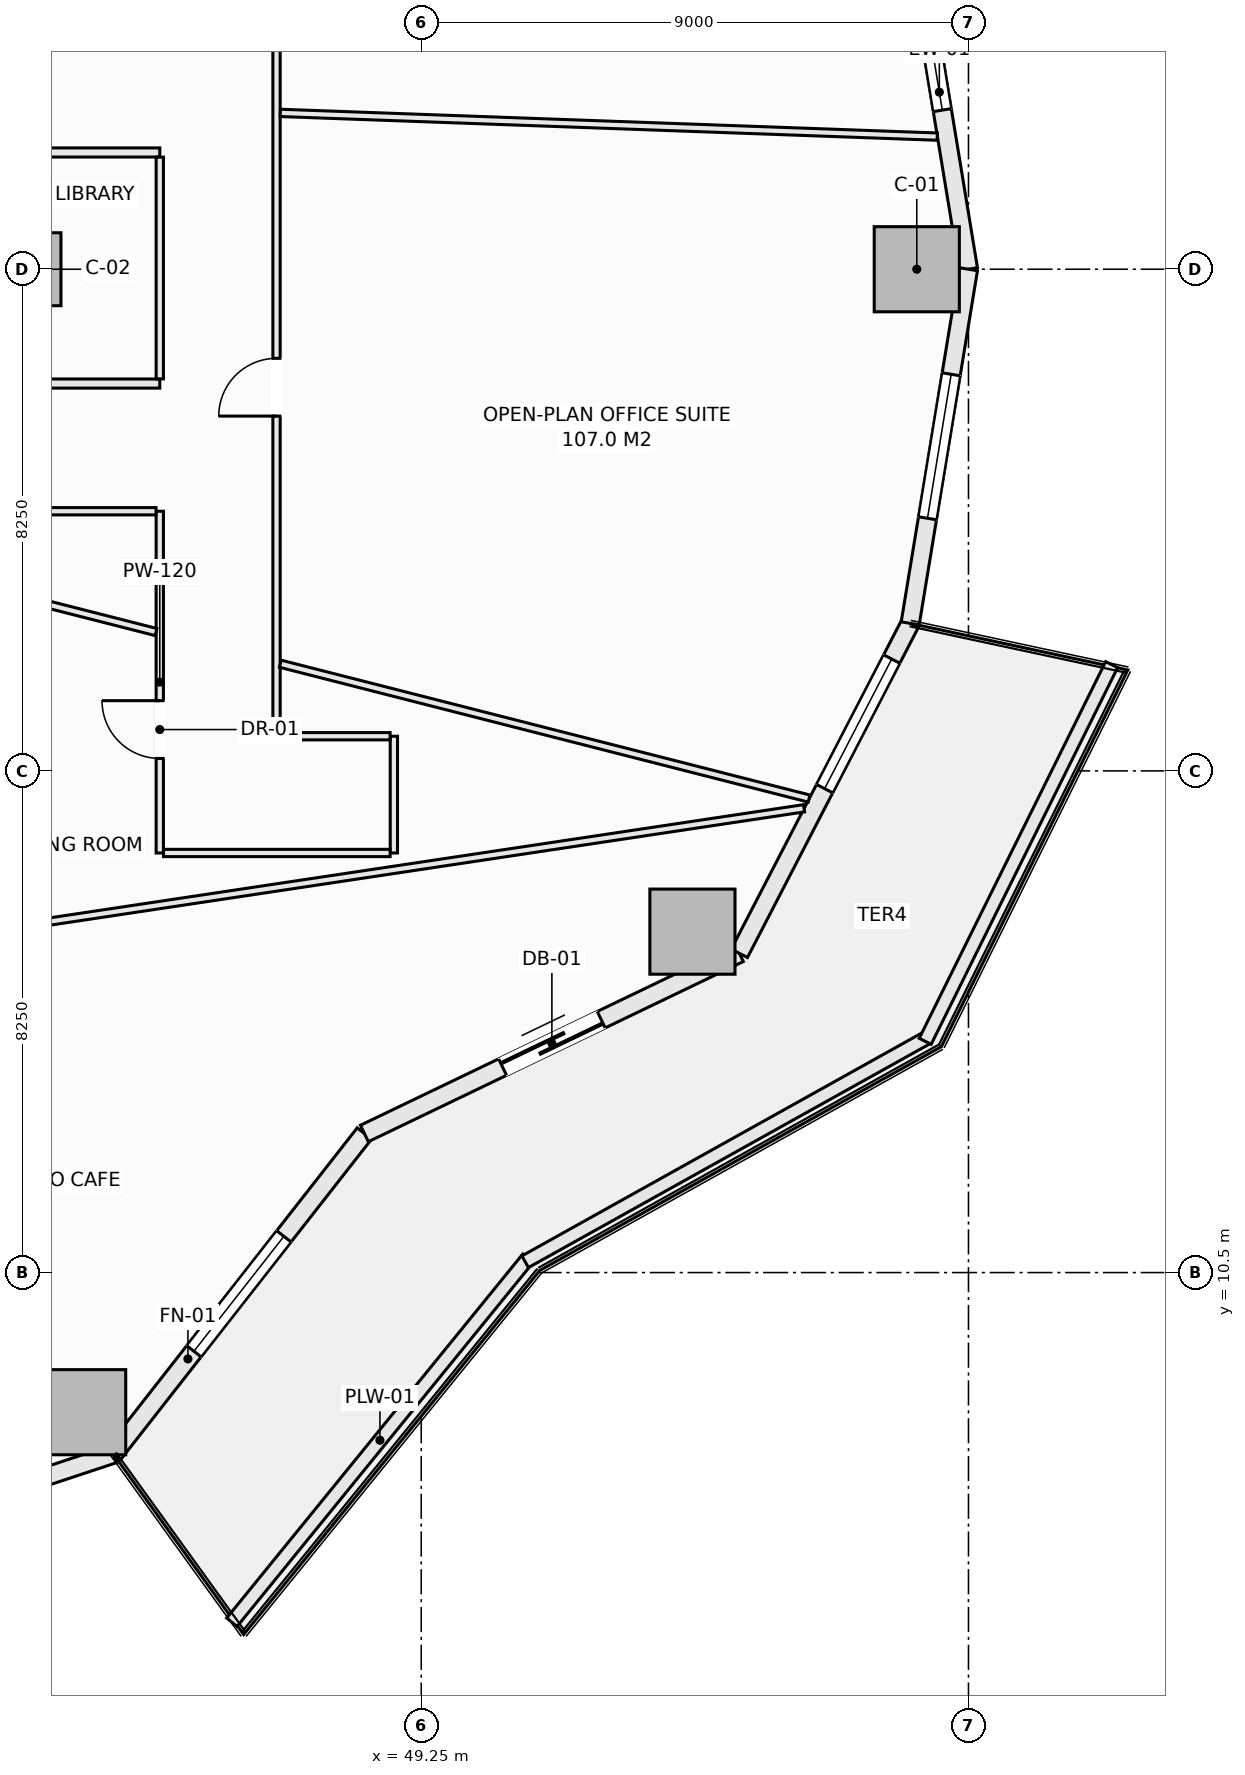
"""IFC4 building model, lengths in metres.
Left out: names, types, materials, properties, quantities, classifications, styles, units other than length and angle.
Written with IfcOpenShell. Run it as: python <this file> out.ifc"""

import sys

from ifc_helpers import new_model, si_unit, direction, frame, frame_2d, origin, origin_2d, place, context, subcontext, project, spatial, rectangle, extrude, element, fill, save


model = new_model("IFC4")
c1 = context("Model", 3, precision=1e-05, world=origin(), true_north=direction((0.0, 1.0)))
c2 = subcontext(c1, "Body", "Model", "MODEL_VIEW")
j1 = project(units=[si_unit("LENGTHUNIT", "METRE"), si_unit("PLANEANGLEUNIT", "RADIAN")], contexts=[c1])
p1 = place(None, origin())
s1 = spatial("IfcSite", under=j1, at=p1, CompositionType="ELEMENT")
p2 = place(p1, origin())
s2 = spatial("IfcBuilding", under=s1, at=p2, CompositionType="ELEMENT")
p3 = place(p2, frame((0.0, 0.0, 45.75)))
s3 = spatial("IfcBuildingStorey", under=s2, at=p3, CompositionType="ELEMENT", Elevation=45.75)
for number, where, z_axis, x_axis in (
    (1, (57.4, 27.0, -0.28), (0.0, 0.0, 1.0), (1.0, 0.0, 0.0)),
    (2, (43.69, 8.204, -0.28), (0.0, 0.0, 1.0), (1.0, 0.0, 0.0)),
    (3, (53.71, 16.106, -0.28), (0.0, 0.0, 1.0), (1.0, 0.0, 0.0)),
):
    element("IfcColumn", number, at=place(p3, frame(where, z_axis=z_axis, x_axis=x_axis)), inside=s3, PredefinedType="COLUMN", context=c2, shape_type="SweptSolid", body=[
        extrude(rectangle(XDim=1.4, YDim=1.4, at=origin_2d()), origin(), (0.0, 0.0, 1.0), 3.85),
    ])
p4 = place(p3, frame((42.725, 27.0, -0.28), z_axis=(0.0, 0.0, 1.0), x_axis=(1.0, 0.0, 0.0)))
e4 = element("IfcColumn", 4, at=p4, inside=s3, PredefinedType="COLUMN", context=c2, shape_type="SweptSolid", body=[
    extrude(rectangle(XDim=1.2, YDim=1.2, at=origin_2d()), origin(), (0.0, 0.0, 1.0), 3.85),
])
p5 = place(p3, frame((57.292, 32.823, 0.0), z_axis=(0.0, 0.0, 1.0), x_axis=(0.162366057843, -0.98673059305, 0.0)))
e5 = element("IfcWall", 5, at=p5, inside=s3, PredefinedType="SOLIDWALL", context=c2, shape_type="SweptSolid", body=[
    extrude(rectangle(XDim=5.902, YDim=0.3, at=frame_2d((2.951, 0.0))), origin(), (0.0, 0.0, 1.0), 3.093),
])
p6 = place(p5, frame((0.85, 0.0, 0.85)))
e6 = element("IfcOpeningElement", 6, at=p6, cuts=e5, PredefinedType="OPENING", context=c2, shape_type="SweptSolid", body=[
    extrude(rectangle(XDim=2.4, YDim=1.9, at=frame_2d((1.2, 0.95))), frame((0.0, 0.16, 0.0), z_axis=(0.0, -1.0, 0.0), x_axis=(1.0, 0.0, 0.0)), (0.0, 0.0, 1.0), 0.32),
])
p7 = place(p3, frame((37.404, 5.267, 0.0), z_axis=(0.0, 0.0, 1.0), x_axis=(0.949238715533, 0.31455661006, 0.0)))
e7 = element("IfcWall", 7, at=p7, inside=s3, PredefinedType="SOLIDWALL", context=c2, shape_type="SweptSolid", body=[
    extrude(rectangle(XDim=7.146, YDim=0.3, at=frame_2d((3.573, 0.0))), origin(), (0.0, 0.0, 1.0), 3.093),
])
p8 = place(p7, frame((0.85, 0.0, 0.85)))
e8 = element("IfcOpeningElement", 8, at=p8, cuts=e7, PredefinedType="OPENING", context=c2, shape_type="SweptSolid", body=[
    extrude(rectangle(XDim=2.4, YDim=1.9, at=frame_2d((1.2, 0.95))), frame((0.0, 0.16, 0.0), z_axis=(0.0, -1.0, 0.0), x_axis=(1.0, 0.0, 0.0)), (0.0, 0.0, 1.0), 0.32),
])
p9 = place(p3, frame((44.188, 7.514, 0.0), z_axis=(0.0, 0.0, 1.0), x_axis=(0.616421309777, 0.787416515482, 0.0)))
e9 = element("IfcWall", 9, at=p9, inside=s3, PredefinedType="SOLIDWALL", context=c2, shape_type="SweptSolid", body=[
    extrude(rectangle(XDim=6.696, YDim=0.3, at=frame_2d((3.348, 0.0))), origin(), (0.0, 0.0, 1.0), 3.093),
])
p10 = place(p9, frame((2.148, 0.0, 0.85)))
e10 = element("IfcOpeningElement", 10, at=p10, cuts=e9, PredefinedType="OPENING", context=c2, shape_type="SweptSolid", body=[
    extrude(rectangle(XDim=2.4, YDim=1.9, at=frame_2d((1.2, 0.95))), frame((0.0, 0.16, 0.0), z_axis=(0.0, -1.0, 0.0), x_axis=(1.0, 0.0, 0.0)), (0.0, 0.0, 1.0), 0.32),
])
p11 = place(p3, frame((48.315, 12.787, 0.0), z_axis=(0.0, 0.0, 1.0), x_axis=(0.901360393999, 0.433069786673, 0.0)))
e11 = element("IfcWall", 11, at=p11, inside=s3, PredefinedType="SOLIDWALL", context=c2, shape_type="SweptSolid", body=[
    extrude(rectangle(XDim=6.842, YDim=0.3, at=frame_2d((3.421, 0.0))), origin(), (0.0, 0.0, 1.0), 3.093),
])
p12 = place(p11, frame((2.521, 0.0, 0.0)))
e12 = element("IfcOpeningElement", 12, at=p12, cuts=e11, PredefinedType="OPENING", context=c2, shape_type="SweptSolid", body=[
    extrude(rectangle(XDim=1.8, YDim=2.25, at=frame_2d((0.9, 1.125))), frame((0.0, 0.16, 0.0), z_axis=(0.0, -1.0, 0.0), x_axis=(1.0, 0.0, 0.0)), (0.0, 0.0, 1.0), 0.32),
])
p13 = place(p3, frame((54.482, 15.75, 0.0), z_axis=(0.0, 0.0, 1.0), x_axis=(0.459809804413, 0.88801742312, 0.0)))
e13 = element("IfcWall", 13, at=p13, inside=s3, PredefinedType="SOLIDWALL", context=c2, shape_type="SweptSolid", body=[
    extrude(rectangle(XDim=6.111, YDim=0.3, at=frame_2d((3.055, 0.0))), origin(), (0.0, 0.0, 1.0), 3.093),
])
p14 = place(p13, frame((3.05, 0.0, 0.85)))
e14 = element("IfcOpeningElement", 14, at=p14, cuts=e13, PredefinedType="OPENING", context=c2, shape_type="SweptSolid", body=[
    extrude(rectangle(XDim=2.4, YDim=1.9, at=frame_2d((1.2, 0.95))), frame((0.0, 0.16, 0.0), z_axis=(0.0, -1.0, 0.0), x_axis=(1.0, 0.0, 0.0)), (0.0, 0.0, 1.0), 0.32),
])
p15 = place(p3, frame((57.292, 21.177, 0.0), z_axis=(0.0, 0.0, 1.0), x_axis=(0.162366057843, 0.98673059305, 0.0)))
e15 = element("IfcWall", 15, at=p15, inside=s3, PredefinedType="SOLIDWALL", context=c2, shape_type="SweptSolid", body=[
    extrude(rectangle(XDim=5.902, YDim=0.3, at=frame_2d((2.951, 0.0))), origin(), (0.0, 0.0, 1.0), 3.093),
])
p16 = place(p15, frame((1.751, 0.0, 0.85)))
e16 = element("IfcOpeningElement", 16, at=p16, cuts=e15, PredefinedType="OPENING", context=c2, shape_type="SweptSolid", body=[
    extrude(rectangle(XDim=2.4, YDim=1.9, at=frame_2d((1.2, 0.95))), frame((0.0, 0.16, 0.0), z_axis=(0.0, -1.0, 0.0), x_axis=(1.0, 0.0, 0.0)), (0.0, 0.0, 1.0), 0.32),
])
p17 = place(p3, frame((46.136, 4.749, 0.0), z_axis=(0.0, 0.0, 1.0), x_axis=(0.630997450658, 0.775784903993, 0.0)))
e17 = element("IfcWall", 17, at=p17, inside=s3, PredefinedType="PARAPET", context=c2, shape_type="SweptSolid", body=[
    extrude(rectangle(XDim=7.718, YDim=0.22, at=frame_2d((3.859, 0.0))), origin(), (0.0, 0.0, 1.0), 0.52),
])
p18 = place(p3, frame((50.959, 10.678, 0.0), z_axis=(0.0, 0.0, 1.0), x_axis=(0.873500119739, 0.48682393205, 0.0)))
e18 = element("IfcWall", 18, at=p18, inside=s3, PredefinedType="PARAPET", context=c2, shape_type="SweptSolid", body=[
    extrude(rectangle(XDim=7.562, YDim=0.22, at=frame_2d((3.781, 0.0))), origin(), (0.0, 0.0, 1.0), 0.52),
])
p19 = place(p3, frame((57.539, 14.303, 0.0), z_axis=(0.0, 0.0, 1.0), x_axis=(0.443578479433, 0.8962355341, 0.0)))
e19 = element("IfcWall", 19, at=p19, inside=s3, PredefinedType="PARAPET", context=c2, shape_type="SweptSolid", body=[
    extrude(rectangle(XDim=6.911, YDim=0.22, at=frame_2d((3.456, 0.0))), origin(), (0.0, 0.0, 1.0), 0.52),
])
p20 = place(p3, frame((29.78, 25.12, 0.0), z_axis=(0.0, 0.0, 1.0), x_axis=(1.0, 0.0, 0.0)))
e20 = element("IfcWall", 20, at=p20, inside=s3, PredefinedType="PARTITIONING", context=c2, shape_type="SweptSolid", body=[
    extrude(rectangle(XDim=15.17, YDim=0.15, at=frame_2d((7.585, 0.0))), origin(), (0.0, 0.0, 1.0), 3.57),
])
p21 = place(p20, frame((3.14, 0.0, 0.0)))
e21 = element("IfcOpeningElement", 21, at=p21, cuts=e20, PredefinedType="OPENING", context=c2, shape_type="SweptSolid", body=[
    extrude(rectangle(XDim=0.95, YDim=2.1, at=frame_2d((0.475, 1.05))), frame((0.0, 0.085, 0.0), z_axis=(0.0, -1.0, 0.0), x_axis=(1.0, 0.0, 0.0)), (0.0, 0.0, 1.0), 0.17),
])
p22 = place(p20, frame((7.445, 0.0, 0.0)))
e22 = element("IfcOpeningElement", 22, at=p22, cuts=e20, PredefinedType="OPENING", context=c2, shape_type="SweptSolid", body=[
    extrude(rectangle(XDim=0.95, YDim=2.1, at=frame_2d((0.475, 1.05))), frame((0.0, 0.085, 0.0), z_axis=(0.0, -1.0, 0.0), x_axis=(1.0, 0.0, 0.0)), (0.0, 0.0, 1.0), 0.17),
])
p23 = place(p20, frame((10.995, 0.0, 0.0)))
e23 = element("IfcOpeningElement", 23, at=p23, cuts=e20, PredefinedType="OPENING", context=c2, shape_type="SweptSolid", body=[
    extrude(rectangle(XDim=0.95, YDim=2.1, at=frame_2d((0.475, 1.05))), frame((0.0, 0.085, 0.0), z_axis=(0.0, -1.0, 0.0), x_axis=(1.0, 0.0, 0.0)), (0.0, 0.0, 1.0), 0.17),
])
p24 = place(p3, frame((30.077, 28.92, 0.0), z_axis=(0.0, 0.0, 1.0), x_axis=(1.0, 0.0, 0.0)))
e24 = element("IfcWall", 24, at=p24, inside=s3, PredefinedType="PARTITIONING", context=c2, shape_type="SweptSolid", body=[
    extrude(rectangle(XDim=14.873, YDim=0.15, at=frame_2d((7.437, 0.0))), origin(), (0.0, 0.0, 1.0), 3.57),
])
p25 = place(p3, frame((44.95, 17.4, 0.0), z_axis=(0.0, 0.0, 1.0), x_axis=(0.0, 1.0, 0.0)))
e25 = element("IfcWall", 25, at=p25, inside=s3, PredefinedType="PARTITIONING", context=c2, shape_type="SweptSolid", body=[
    extrude(rectangle(XDim=5.62, YDim=0.12, at=frame_2d((2.81, 0.0))), origin(), (0.0, 0.0, 1.0), 3.57),
])
p26 = place(p25, frame((1.555, 0.0, 0.0)))
e26 = element("IfcOpeningElement", 26, at=p26, cuts=e25, PredefinedType="OPENING", context=c2, shape_type="SweptSolid", body=[
    extrude(rectangle(XDim=0.95, YDim=2.1, at=frame_2d((0.475, 1.05))), frame((0.0, 0.07, 0.0), z_axis=(0.0, -1.0, 0.0), x_axis=(1.0, 0.0, 0.0)), (0.0, 0.0, 1.0), 0.14),
])
p27 = place(p3, frame((44.95, 25.197, 0.0), z_axis=(0.0, 0.0, 1.0), x_axis=(0.0, 1.0, 0.0)))
e27 = element("IfcWall", 27, at=p27, inside=s3, PredefinedType="PARTITIONING", context=c2, shape_type="SweptSolid", body=[
    extrude(rectangle(XDim=3.646, YDim=0.12, at=frame_2d((1.823, 0.0))), origin(), (0.0, 0.0, 1.0), 3.57),
])
p28 = place(p3, frame((48.8, 17.4, 0.0), z_axis=(0.0, 0.0, 1.0), x_axis=(0.0, 1.0, 0.0)))
e28 = element("IfcWall", 28, at=p28, inside=s3, PredefinedType="PARTITIONING", context=c2, shape_type="SweptSolid", body=[
    extrude(rectangle(XDim=1.92, YDim=0.12, at=frame_2d((0.96, 0.0))), origin(), (0.0, 0.0, 1.0), 3.57),
])
p29 = place(p3, frame((46.87, 19.32, 0.0), z_axis=(0.0, 0.0, 1.0), x_axis=(0.0, 1.0, 0.0)))
e29 = element("IfcWall", 29, at=p29, inside=s3, PredefinedType="PARTITIONING", context=c2, shape_type="SweptSolid", body=[
    extrude(rectangle(XDim=14.798, YDim=0.12, at=frame_2d((7.399, 0.0))), origin(), (0.0, 0.0, 1.0), 3.57),
])
p30 = place(p29, frame((5.265, 0.0, 0.0)))
e30 = element("IfcOpeningElement", 30, at=p30, cuts=e29, PredefinedType="OPENING", context=c2, shape_type="SweptSolid", body=[
    extrude(rectangle(XDim=0.95, YDim=2.1, at=frame_2d((0.475, 1.05))), frame((0.0, 0.07, 0.0), z_axis=(0.0, -1.0, 0.0), x_axis=(1.0, 0.0, 0.0)), (0.0, 0.0, 1.0), 0.14),
])
p31 = place(p29, frame((11.845, 0.0, 0.0)))
e31 = element("IfcOpeningElement", 31, at=p31, cuts=e29, PredefinedType="OPENING", context=c2, shape_type="SweptSolid", body=[
    extrude(rectangle(XDim=0.95, YDim=2.1, at=frame_2d((0.475, 1.05))), frame((0.0, 0.07, 0.0), z_axis=(0.0, -1.0, 0.0), x_axis=(1.0, 0.0, 0.0)), (0.0, 0.0, 1.0), 0.14),
])
p32 = place(p3, frame((46.932, 19.32, 0.0), z_axis=(0.0, 0.0, 1.0), x_axis=(1.0, 0.0, 0.0)))
e32 = element("IfcWall", 32, at=p32, inside=s3, PredefinedType="PARTITIONING", context=c2, shape_type="SweptSolid", body=[
    extrude(rectangle(XDim=1.806, YDim=0.12, at=frame_2d((0.903, 0.0))), origin(), (0.0, 0.0, 1.0), 3.205),
])
p33 = place(p3, frame((45.012, 17.4, 0.0), z_axis=(0.0, 0.0, 1.0), x_axis=(1.0, 0.0, 0.0)))
e33 = element("IfcWall", 33, at=p33, inside=s3, PredefinedType="PARTITIONING", context=c2, shape_type="SweptSolid", body=[
    extrude(rectangle(XDim=3.726, YDim=0.12, at=frame_2d((1.863, 0.0))), origin(), (0.0, 0.0, 1.0), 3.57),
])
p34 = place(p3, frame((39.0, 23.02, 0.0), z_axis=(0.0, 0.0, 1.0), x_axis=(1.0, 0.0, 0.0)))
e34 = element("IfcWall", 34, at=p34, inside=s3, PredefinedType="PARTITIONING", context=c2, shape_type="SweptSolid", body=[
    extrude(rectangle(XDim=5.888, YDim=0.12, at=frame_2d((2.944, 0.0))), origin(), (0.0, 0.0, 1.0), 3.57),
])
p35 = place(p3, frame((39.015, 22.531, 0.0), z_axis=(0.0, 0.0, 1.0), x_axis=(0.968999219603, -0.247063782066, 0.0)))
e35 = element("IfcWall", 35, at=p35, inside=s3, PredefinedType="PARTITIONING", context=c2, shape_type="SweptSolid", body=[
    extrude(rectangle(XDim=6.061, YDim=0.12, at=frame_2d((3.03, 0.0))), origin(), (0.0, 0.0, 1.0), 3.205),
])
p36 = place(p3, frame((46.932, 20.512, 0.0), z_axis=(0.0, 0.0, 1.0), x_axis=(0.969002278344, -0.247051785187, 0.0)))
e36 = element("IfcWall", 36, at=p36, inside=s3, PredefinedType="PARTITIONING", context=c2, shape_type="SweptSolid", body=[
    extrude(rectangle(XDim=8.975, YDim=0.12, at=frame_2d((4.488, 0.0))), origin(), (0.0, 0.0, 1.0), 3.57),
])
p37 = place(p3, frame((38.241, 15.537, 0.0), z_axis=(0.0, 0.0, 1.0), x_axis=(0.988910037188, 0.148515784849, 0.0)))
e37 = element("IfcWall", 37, at=p37, inside=s3, PredefinedType="PARTITIONING", context=c2, shape_type="SweptSolid", body=[
    extrude(rectangle(XDim=17.499, YDim=0.12, at=frame_2d((8.75, 0.0))), origin(), (0.0, 0.0, 1.0), 3.205),
])
p38 = place(p3, frame((46.932, 29.571, 0.0), z_axis=(0.0, 0.0, 1.0), x_axis=(0.999348798182, -0.036082954031, 0.0)))
e38 = element("IfcWall", 38, at=p38, inside=s3, PredefinedType="PARTITIONING", context=c2, shape_type="SweptSolid", body=[
    extrude(rectangle(XDim=10.812, YDim=0.12, at=frame_2d((5.406, 0.0))), origin(), (0.0, 0.0, 1.0), 3.57),
])
p39 = place(p6, origin())
e39 = element("IfcWindow", 39, at=p39, inside=s3, PartitioningType="SINGLE_PANEL", PredefinedType="WINDOW", context=c2, shape_type="SweptSolid", body=[
    extrude(rectangle(XDim=2.4, YDim=1.9, at=frame_2d((1.2, 0.95))), frame((0.0, 0.03, 0.0), z_axis=(0.0, -1.0, 0.0), x_axis=(1.0, 0.0, 0.0)), (0.0, 0.0, 1.0), 0.06),
])
fill(e6, e39)
p40 = place(p10, origin())
e40 = element("IfcWindow", 40, at=p40, inside=s3, PartitioningType="SINGLE_PANEL", PredefinedType="WINDOW", context=c2, shape_type="SweptSolid", body=[
    extrude(rectangle(XDim=2.4, YDim=1.9, at=frame_2d((1.2, 0.95))), frame((0.0, 0.03, 0.0), z_axis=(0.0, -1.0, 0.0), x_axis=(1.0, 0.0, 0.0)), (0.0, 0.0, 1.0), 0.06),
])
fill(e10, e40)
p41 = place(p12, frame((1.8, 0.0, 0.0), z_axis=(0.0, 0.0, 1.0), x_axis=(-1.0, 0.0, 0.0)))
e41 = element("IfcDoor", 41, at=p41, inside=s3, OperationType="SLIDING_TO_LEFT", PredefinedType="DOOR", context=c2, shape_type="SweptSolid", body=[
    extrude(rectangle(XDim=1.8, YDim=2.25, at=frame_2d((0.9, 1.125))), frame((0.0, 0.025, 0.0), z_axis=(0.0, -1.0, 0.0), x_axis=(1.0, 0.0, 0.0)), (0.0, 0.0, 1.0), 0.05),
])
fill(e12, e41)
p42 = place(p14, origin())
e42 = element("IfcWindow", 42, at=p42, inside=s3, PartitioningType="SINGLE_PANEL", PredefinedType="WINDOW", context=c2, shape_type="SweptSolid", body=[
    extrude(rectangle(XDim=2.4, YDim=1.9, at=frame_2d((1.2, 0.95))), frame((0.0, 0.03, 0.0), z_axis=(0.0, -1.0, 0.0), x_axis=(1.0, 0.0, 0.0)), (0.0, 0.0, 1.0), 0.06),
])
fill(e14, e42)
p43 = place(p16, origin())
e43 = element("IfcWindow", 43, at=p43, inside=s3, PartitioningType="SINGLE_PANEL", PredefinedType="WINDOW", context=c2, shape_type="SweptSolid", body=[
    extrude(rectangle(XDim=2.4, YDim=1.9, at=frame_2d((1.2, 0.95))), frame((0.0, 0.03, 0.0), z_axis=(0.0, -1.0, 0.0), x_axis=(1.0, 0.0, 0.0)), (0.0, 0.0, 1.0), 0.06),
])
fill(e16, e43)
p44 = place(p26, origin())
e44 = element("IfcDoor", 44, at=p44, inside=s3, OperationType="SINGLE_SWING_RIGHT", PredefinedType="DOOR", context=c2, shape_type="SweptSolid", body=[
    extrude(rectangle(XDim=0.95, YDim=2.1, at=frame_2d((0.475, 1.05))), frame((0.0, 0.025, 0.0), z_axis=(0.0, -1.0, 0.0), x_axis=(1.0, 0.0, 0.0)), (0.0, 0.0, 1.0), 0.05),
])
fill(e26, e44)
p45 = place(p30, origin())
e45 = element("IfcDoor", 45, at=p45, inside=s3, OperationType="SINGLE_SWING_LEFT", PredefinedType="DOOR", context=c2, shape_type="SweptSolid", body=[
    extrude(rectangle(XDim=0.95, YDim=2.1, at=frame_2d((0.475, 1.05))), frame((0.0, 0.025, 0.0), z_axis=(0.0, -1.0, 0.0), x_axis=(1.0, 0.0, 0.0)), (0.0, 0.0, 1.0), 0.05),
])
fill(e30, e45)
save(model, sys.argv[1])
